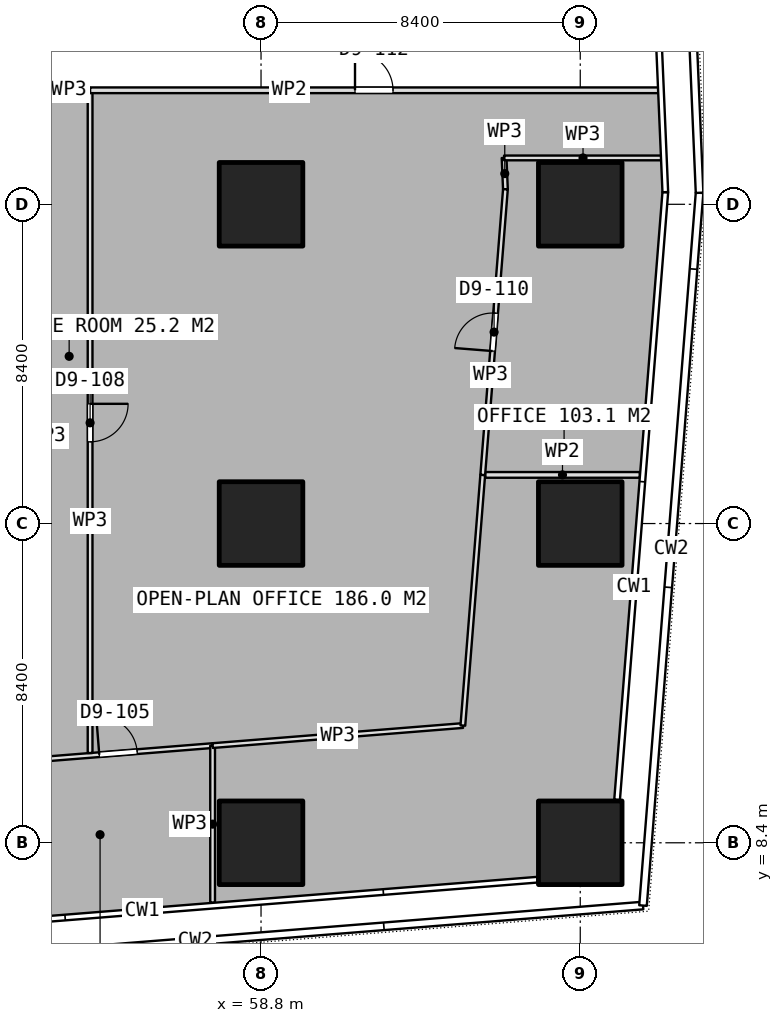
"""IFC4 building model, lengths in metres.
Left out: names, types, materials, properties, quantities, classifications, styles, units other than length and angle.
Written with IfcOpenShell. Run it as: python <this file> out.ifc"""

import sys

from ifc_helpers import new_model, si_unit, direction, frame, frame_2d, origin, origin_2d, place, context, subcontext, project, spatial, rectangle, extrude, element, fill, save


model = new_model("IFC4")
c1 = context("Model", 3, precision=1e-05, world=origin(), true_north=direction((0.0, 1.0)))
c2 = subcontext(c1, "Body", "Model", "MODEL_VIEW")
j1 = project(units=[si_unit("LENGTHUNIT", "METRE"), si_unit("PLANEANGLEUNIT", "RADIAN")], contexts=[c1])
p1 = place(None, origin())
s1 = spatial("IfcSite", under=j1, at=p1, CompositionType="ELEMENT")
p2 = place(p1, origin())
s2 = spatial("IfcBuilding", under=s1, at=p2, CompositionType="ELEMENT")
p3 = place(p2, frame((0.0, 0.0, 44.15)))
s3 = spatial("IfcBuildingStorey", under=s2, at=p3, CompositionType="ELEMENT", Elevation=44.15)
for number, where, z_axis, x_axis in (
    (1, (58.8, 8.4, 0.0), (0.0, 0.0, 1.0), (1.0, 0.0, 0.0)),
    (2, (58.8, 16.8, 0.0), (0.0, 0.0, 1.0), (1.0, 0.0, 0.0)),
    (3, (58.8, 25.2, 0.0), (0.0, 0.0, 1.0), (1.0, 0.0, 0.0)),
    (4, (67.2, 8.4, 0.0), (0.0, 0.0, 1.0), (1.0, 0.0, 0.0)),
    (5, (67.2, 16.8, 0.0), (0.0, 0.0, 1.0), (1.0, 0.0, 0.0)),
    (6, (67.2, 25.2, 0.0), (0.0, 0.0, 1.0), (1.0, 0.0, 0.0)),
):
    element("IfcColumn", number, at=place(p3, frame(where, z_axis=z_axis, x_axis=x_axis)), inside=s3, PredefinedType="COLUMN", context=c2, shape_type="SweptSolid", body=[
        extrude(rectangle(XDim=2.2, YDim=2.2, at=origin_2d()), origin(), (0.0, 0.0, 1.0), 3.75),
    ])
p4 = place(p3, frame((51.603, 10.483, 0.0), z_axis=(0.0, 0.0, 1.0), x_axis=(0.996811357903, 0.079794215047, 0.0)))
e7 = element("IfcWall", 7, at=p4, inside=s3, PredefinedType="PARTITIONING", context=c2, shape_type="SweptSolid", body=[
    extrude(rectangle(XDim=5.942, YDim=0.125, at=frame_2d((2.971, 0.0))), origin(), (0.0, 0.0, 1.0), 3.5),
])
p5 = place(p4, frame((2.95, 0.0, 0.0)))
e8 = element("IfcOpeningElement", 8, at=p5, cuts=e7, PredefinedType="OPENING", context=c2, shape_type="SweptSolid", body=[
    extrude(rectangle(XDim=1.0, YDim=2.1, at=frame_2d((0.5, 1.05))), frame((0.0, 0.073, 0.0), z_axis=(0.0, -1.0, 0.0), x_axis=(1.0, 0.0, 0.0)), (0.0, 0.0, 1.0), 0.145),
])
p6 = place(p3, frame((57.526, 10.957, 0.0), z_axis=(0.0, 0.0, 1.0), x_axis=(0.0, -1.0, 0.0)))
e9 = element("IfcWall", 9, at=p6, inside=s3, PredefinedType="PARTITIONING", context=c2, shape_type="SweptSolid", body=[
    extrude(rectangle(XDim=4.133, YDim=0.125, at=frame_2d((2.066, 0.0))), origin(), (0.0, 0.0, 1.0), 3.5),
])
p7 = place(p3, frame((65.231, 25.596, 0.0), z_axis=(0.0, 0.0, 1.0), x_axis=(-0.042332388835, 0.999103582646, 0.0)))
e10 = element("IfcWall", 10, at=p7, inside=s3, PredefinedType="PARTITIONING", context=c2, shape_type="SweptSolid", body=[
    extrude(rectangle(XDim=0.825, YDim=0.125, at=frame_2d((0.412, 0.0))), origin(), (0.0, 0.0, 1.0), 3.5),
])
p8 = place(p3, frame((65.196, 26.42, 0.0), z_axis=(0.0, 0.0, 1.0), x_axis=(1.0, 0.0, 0.0)))
e11 = element("IfcWall", 11, at=p8, inside=s3, PredefinedType="PARTITIONING", context=c2, shape_type="SweptSolid", body=[
    extrude(rectangle(XDim=4.154, YDim=0.125, at=frame_2d((2.077, 0.0))), origin(), (0.0, 0.0, 1.0), 3.5),
])
p9 = place(p3, frame((57.527, 10.957, 0.0), z_axis=(0.0, 0.0, 1.0), x_axis=(0.996798921347, 0.079949424016, 0.0)))
e12 = element("IfcWall", 12, at=p9, inside=s3, PredefinedType="PARTITIONING", context=c2, shape_type="SweptSolid", body=[
    extrude(rectangle(XDim=6.605, YDim=0.125, at=frame_2d((3.303, 0.0))), origin(), (0.0, 0.0, 1.0), 3.5),
])
p10 = place(p3, frame((64.111, 11.485, 0.0), z_axis=(0.0, 0.0, 1.0), x_axis=(0.079058664354, 0.996869965236, 0.0)))
e13 = element("IfcWall", 13, at=p10, inside=s3, PredefinedType="PARTITIONING", context=c2, shape_type="SweptSolid", body=[
    extrude(rectangle(XDim=6.615, YDim=0.125, at=frame_2d((3.307, 0.0))), origin(), (0.0, 0.0, 1.0), 3.5),
])
p11 = place(p3, frame((64.634, 18.079, 0.0), z_axis=(0.0, 0.0, 1.0), x_axis=(0.079162264547, 0.996861743609, 0.0)))
e14 = element("IfcWall", 14, at=p11, inside=s3, PredefinedType="PARTITIONING", context=c2, shape_type="SweptSolid", body=[
    extrude(rectangle(XDim=7.541, YDim=0.125, at=frame_2d((3.77, 0.0))), origin(), (0.0, 0.0, 1.0), 3.5),
])
p12 = place(p11, frame((3.27, 0.0, 0.0)))
e15 = element("IfcOpeningElement", 15, at=p12, cuts=e14, PredefinedType="OPENING", context=c2, shape_type="SweptSolid", body=[
    extrude(rectangle(XDim=1.0, YDim=2.1, at=frame_2d((0.5, 1.05))), frame((0.0, 0.073, 0.0), z_axis=(0.0, -1.0, 0.0), x_axis=(1.0, 0.0, 0.0)), (0.0, 0.0, 1.0), 0.145),
])
p13 = place(p3, frame((53.2, 28.2, 0.0), z_axis=(0.0, 0.0, 1.0), x_axis=(1.0, 0.0, 0.0)))
e16 = element("IfcWall", 16, at=p13, inside=s3, PredefinedType="PARTITIONING", context=c2, shape_type="SweptSolid", body=[
    extrude(rectangle(XDim=1.102, YDim=0.125, at=frame_2d((0.551, 0.0))), origin(), (0.0, 0.0, 1.0), 3.5),
])
p14 = place(p3, frame((54.302, 28.2, 0.0), z_axis=(0.0, 0.0, 1.0), x_axis=(0.0, -1.0, 0.0)))
e17 = element("IfcWall", 17, at=p14, inside=s3, PredefinedType="PARTITIONING", context=c2, shape_type="SweptSolid", body=[
    extrude(rectangle(XDim=17.438, YDim=0.125, at=frame_2d((8.719, 0.0))), origin(), (0.0, 0.0, 1.0), 3.5),
])
p15 = place(p14, frame((8.25, 0.0, 0.0)))
e18 = element("IfcOpeningElement", 18, at=p15, cuts=e17, PredefinedType="OPENING", context=c2, shape_type="SweptSolid", body=[
    extrude(rectangle(XDim=1.0, YDim=2.1, at=frame_2d((0.5, 1.05))), frame((0.0, 0.073, 0.0), z_axis=(0.0, -1.0, 0.0), x_axis=(1.0, 0.0, 0.0)), (0.0, 0.0, 1.0), 0.145),
])
p16 = place(p3, frame((54.302, 28.2, 0.0), z_axis=(0.0, 0.0, 1.0), x_axis=(1.0, 0.0, 0.0)))
e19 = element("IfcWall", 19, at=p16, inside=s3, PredefinedType="PARTITIONING", context=c2, shape_type="SweptSolid", body=[
    extrude(rectangle(XDim=14.972, YDim=0.15, at=frame_2d((7.486, 0.0))), origin(), (0.0, 0.0, 1.0), 3.5),
])
p17 = place(p16, frame((6.971, 0.0, 0.0)))
e20 = element("IfcOpeningElement", 20, at=p17, cuts=e19, PredefinedType="OPENING", context=c2, shape_type="SweptSolid", body=[
    extrude(rectangle(XDim=1.0, YDim=2.1, at=frame_2d((0.5, 1.05))), frame((0.0, 0.085, 0.0), z_axis=(0.0, -1.0, 0.0), x_axis=(1.0, 0.0, 0.0)), (0.0, 0.0, 1.0), 0.17),
])
p18 = place(p3, frame((64.697, 18.08, 0.0), z_axis=(0.0, 0.0, 1.0), x_axis=(1.0, 0.0, 0.0)))
e21 = element("IfcWall", 21, at=p18, inside=s3, PredefinedType="PARTITIONING", context=c2, shape_type="SweptSolid", body=[
    extrude(rectangle(XDim=4.071, YDim=0.15, at=frame_2d((2.036, 0.0))), origin(), (0.0, 0.0, 1.0), 3.5),
])
p19 = place(p5, origin())
e22 = element("IfcDoor", 22, at=p19, inside=s3, OperationType="SINGLE_SWING_LEFT", PredefinedType="DOOR", context=c2, shape_type="SweptSolid", body=[
    extrude(rectangle(XDim=1.0, YDim=2.1, at=frame_2d((0.5, 1.05))), frame((0.0, 0.025, 0.0), z_axis=(0.0, -1.0, 0.0), x_axis=(1.0, 0.0, 0.0)), (0.0, 0.0, 1.0), 0.05),
])
fill(e8, e22)
p20 = place(p12, origin())
e23 = element("IfcDoor", 23, at=p20, inside=s3, OperationType="SINGLE_SWING_LEFT", PredefinedType="DOOR", context=c2, shape_type="SweptSolid", body=[
    extrude(rectangle(XDim=1.0, YDim=2.1, at=frame_2d((0.5, 1.05))), frame((0.0, 0.025, 0.0), z_axis=(0.0, -1.0, 0.0), x_axis=(1.0, 0.0, 0.0)), (0.0, 0.0, 1.0), 0.05),
])
fill(e15, e23)
p21 = place(p15, origin())
e24 = element("IfcDoor", 24, at=p21, inside=s3, OperationType="SINGLE_SWING_LEFT", PredefinedType="DOOR", context=c2, shape_type="SweptSolid", body=[
    extrude(rectangle(XDim=1.0, YDim=2.1, at=frame_2d((0.5, 1.05))), frame((0.0, 0.025, 0.0), z_axis=(0.0, -1.0, 0.0), x_axis=(1.0, 0.0, 0.0)), (0.0, 0.0, 1.0), 0.05),
])
fill(e18, e24)
p22 = place(p17, origin())
e25 = element("IfcDoor", 25, at=p22, inside=s3, OperationType="SINGLE_SWING_LEFT", PredefinedType="DOOR", context=c2, shape_type="SweptSolid", body=[
    extrude(rectangle(XDim=1.0, YDim=2.1, at=frame_2d((0.5, 1.05))), frame((0.0, 0.025, 0.0), z_axis=(0.0, -1.0, 0.0), x_axis=(1.0, 0.0, 0.0)), (0.0, 0.0, 1.0), 0.05),
])
fill(e20, e25)
save(model, sys.argv[1])
